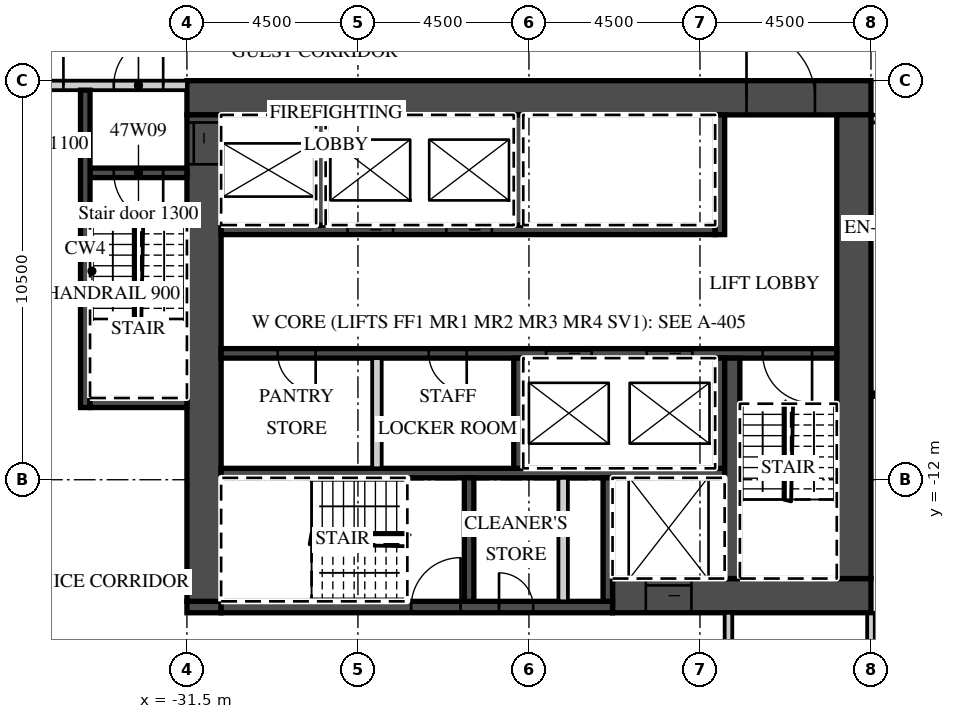
"""IFC4 building model, lengths in metres.
Left out: names, types, materials, properties, quantities, classifications, styles, units other than length and angle.
Written with IfcOpenShell. Run it as: python <this file> out.ifc"""

import sys

from ifc_helpers import new_model, si_unit, direction, frame, frame_2d, origin, place, context, subcontext, project, spatial, rectangle, extrude, element, fill, save


model = new_model("IFC4")
c1 = context("Model", 3, precision=1e-05, world=origin(), true_north=direction((0.0, 1.0)))
c2 = subcontext(c1, "Body", "Model", "MODEL_VIEW")
j1 = project(units=[si_unit("LENGTHUNIT", "METRE"), si_unit("PLANEANGLEUNIT", "RADIAN")], contexts=[c1])
p1 = place(None, origin())
s1 = spatial("IfcSite", under=j1, at=p1, CompositionType="ELEMENT")
p2 = place(p1, origin())
s2 = spatial("IfcBuilding", under=s1, at=p2, CompositionType="ELEMENT")
p3 = place(p2, frame((0.0, 0.0, 196.6)))
s3 = spatial("IfcBuildingStorey", under=s2, at=p3, CompositionType="ELEMENT", Elevation=196.6)
p4 = place(p3, frame((-13.5, -22.3, 0.0), z_axis=(0.0, 0.0, 1.0), x_axis=(0.0, 1.0, 0.0)))
e1 = element("IfcWall", 1, at=p4, inside=s3, PredefinedType="PARTITIONING", context=c2, shape_type="SweptSolid", body=[
    extrude(rectangle(XDim=6.8, YDim=0.2, at=frame_2d((3.4, 0.0))), origin(), (0.0, 0.0, 1.0), 3.02),
])
p5 = place(p3, frame((-13.5, -2.5, 0.0), z_axis=(0.0, 0.0, 1.0), x_axis=(1.0, 0.0, 0.0)))
e2 = element("IfcWall", 2, at=p5, inside=s3, PredefinedType="PARTITIONING", context=c2, shape_type="SweptSolid", body=[
    extrude(rectangle(XDim=27.0, YDim=0.2, at=frame_2d((13.5, 0.0))), origin(), (0.0, 0.0, 1.0), 3.02),
])
p6 = place(p5, frame((2.925, 0.0, 0.0)))
e3 = element("IfcOpeningElement", 3, at=p6, cuts=e2, PredefinedType="OPENING", context=c2, shape_type="SweptSolid", body=[
    extrude(rectangle(XDim=1.0, YDim=2.1, at=frame_2d((0.5, 1.05))), frame((0.0, 0.11, 0.0), z_axis=(0.0, -1.0, 0.0), x_axis=(1.0, 0.0, 0.0)), (0.0, 0.0, 1.0), 0.22),
])
p7 = place(p5, frame((5.075, 0.0, 0.0)))
e4 = element("IfcOpeningElement", 4, at=p7, cuts=e2, PredefinedType="OPENING", context=c2, shape_type="SweptSolid", body=[
    extrude(rectangle(XDim=1.0, YDim=2.1, at=frame_2d((0.5, 1.05))), frame((0.0, 0.11, 0.0), z_axis=(0.0, -1.0, 0.0), x_axis=(1.0, 0.0, 0.0)), (0.0, 0.0, 1.0), 0.22),
])
p8 = place(p5, frame((11.925, 0.0, 0.0)))
e5 = element("IfcOpeningElement", 5, at=p8, cuts=e2, PredefinedType="OPENING", context=c2, shape_type="SweptSolid", body=[
    extrude(rectangle(XDim=1.0, YDim=2.1, at=frame_2d((0.5, 1.05))), frame((0.0, 0.11, 0.0), z_axis=(0.0, -1.0, 0.0), x_axis=(1.0, 0.0, 0.0)), (0.0, 0.0, 1.0), 0.22),
])
p9 = place(p5, frame((15.938, 0.0, 0.0)))
e6 = element("IfcOpeningElement", 6, at=p9, cuts=e2, PredefinedType="OPENING", context=c2, shape_type="SweptSolid", body=[
    extrude(rectangle(XDim=1.2, YDim=2.1, at=frame_2d((0.6, 1.05))), frame((0.0, 0.11, 0.0), z_axis=(0.0, -1.0, 0.0), x_axis=(1.0, 0.0, 0.0)), (0.0, 0.0, 1.0), 0.22),
])
p10 = place(p5, frame((25.425, 0.0, 0.0)))
e7 = element("IfcOpeningElement", 7, at=p10, cuts=e2, PredefinedType="OPENING", context=c2, shape_type="SweptSolid", body=[
    extrude(rectangle(XDim=1.0, YDim=2.1, at=frame_2d((0.5, 1.05))), frame((0.0, 0.11, 0.0), z_axis=(0.0, -1.0, 0.0), x_axis=(1.0, 0.0, 0.0)), (0.0, 0.0, 1.0), 0.22),
])
p11 = place(p3, frame((-31.5, -1.95, 0.0), z_axis=(0.0, 0.0, 1.0), x_axis=(1.0, 0.0, 0.0)))
e8 = element("IfcWall", 8, at=p11, inside=s3, PredefinedType="SHEAR", context=c2, shape_type="SweptSolid", body=[
    extrude(rectangle(XDim=18.0, YDim=0.9, at=frame_2d((9.0, 0.0))), origin(), (0.0, 0.0, 1.0), 3.02),
])
p12 = place(p11, frame((14.725, 0.0, 0.0)))
e9 = element("IfcOpeningElement", 9, at=p12, cuts=e8, PredefinedType="OPENING", context=c2, shape_type="SweptSolid", body=[
    extrude(rectangle(XDim=1.8, YDim=2.1, at=frame_2d((0.9, 1.05))), frame((0.0, 0.46, 0.0), z_axis=(0.0, -1.0, 0.0), x_axis=(1.0, 0.0, 0.0)), (0.0, 0.0, 1.0), 0.92),
])
p13 = place(p3, frame((-20.3, -15.05, 0.0), z_axis=(0.0, 0.0, 1.0), x_axis=(1.0, 0.0, 0.0)))
e10 = element("IfcWall", 10, at=p13, inside=s3, PredefinedType="SHEAR", context=c2, shape_type="SweptSolid", body=[
    extrude(rectangle(XDim=6.8, YDim=0.9, at=frame_2d((3.4, 0.0))), origin(), (0.0, 0.0, 1.0), 3.02),
])
p14 = place(p13, frame((0.875, 0.0, 0.0)))
e11 = element("IfcOpeningElement", 11, at=p14, cuts=e10, PredefinedType="OPENING", context=c2, shape_type="SweptSolid", body=[
    extrude(rectangle(XDim=1.2, YDim=2.1, at=frame_2d((0.6, 1.05))), frame((0.0, 0.46, 0.0), z_axis=(0.0, -1.0, 0.0), x_axis=(1.0, 0.0, 0.0)), (0.0, 0.0, 1.0), 0.92),
])
p15 = place(p3, frame((-31.5, -15.35, 0.0), z_axis=(0.0, 0.0, 1.0), x_axis=(1.0, 0.0, 0.0)))
e12 = element("IfcWall", 12, at=p15, inside=s3, PredefinedType="SHEAR", context=c2, shape_type="SweptSolid", body=[
    extrude(rectangle(XDim=0.9, YDim=0.3, at=frame_2d((0.45, 0.0))), origin(), (0.0, 0.0, 1.0), 3.02),
])
p16 = place(p3, frame((-30.6, -15.35, 0.0), z_axis=(0.0, 0.0, 1.0), x_axis=(1.0, 0.0, 0.0)))
e13 = element("IfcWall", 13, at=p16, inside=s3, PredefinedType="SHEAR", context=c2, shape_type="SweptSolid", body=[
    extrude(rectangle(XDim=10.3, YDim=0.3, at=frame_2d((5.15, 0.0))), origin(), (0.0, 0.0, 1.0), 3.02),
])
p17 = place(p16, frame((5.0, 0.0, 0.0)))
e14 = element("IfcOpeningElement", 14, at=p17, cuts=e13, PredefinedType="OPENING", context=c2, shape_type="SweptSolid", body=[
    extrude(rectangle(XDim=1.3, YDim=2.1, at=frame_2d((0.65, 1.05))), frame((0.0, 0.16, 0.0), z_axis=(0.0, -1.0, 0.0), x_axis=(1.0, 0.0, 0.0)), (0.0, 0.0, 1.0), 0.32),
])
p18 = place(p16, frame((7.312, 0.0, 0.0)))
e15 = element("IfcOpeningElement", 15, at=p18, cuts=e13, PredefinedType="OPENING", context=c2, shape_type="SweptSolid", body=[
    extrude(rectangle(XDim=0.9, YDim=2.1, at=frame_2d((0.45, 1.05))), frame((0.0, 0.16, 0.0), z_axis=(0.0, -1.0, 0.0), x_axis=(1.0, 0.0, 0.0)), (0.0, 0.0, 1.0), 0.32),
])
p19 = place(p3, frame((-31.05, -15.2, 0.0), z_axis=(0.0, 0.0, 1.0), x_axis=(0.0, 1.0, 0.0)))
e16 = element("IfcWall", 16, at=p19, inside=s3, PredefinedType="SHEAR", context=c2, shape_type="SweptSolid", body=[
    extrude(rectangle(XDim=12.8, YDim=0.9, at=frame_2d((6.4, 0.0))), origin(), (0.0, 0.0, 1.0), 3.02),
])
p20 = place(p19, frame((11.5, 0.0, 0.0)))
e17 = element("IfcOpeningElement", 17, at=p20, cuts=e16, PredefinedType="OPENING", context=c2, shape_type="SweptSolid", body=[
    extrude(rectangle(XDim=1.1, YDim=2.1, at=frame_2d((0.55, 1.05))), frame((0.0, 0.46, 0.0), z_axis=(0.0, -1.0, 0.0), x_axis=(1.0, 0.0, 0.0)), (0.0, 0.0, 1.0), 0.92),
])
p21 = place(p3, frame((-13.95, -14.6, 0.0), z_axis=(0.0, 0.0, 1.0), x_axis=(0.0, 1.0, 0.0)))
e18 = element("IfcWall", 18, at=p21, inside=s3, PredefinedType="SHEAR", context=c2, shape_type="SweptSolid", body=[
    extrude(rectangle(XDim=12.2, YDim=0.9, at=frame_2d((6.1, 0.0))), origin(), (0.0, 0.0, 1.0), 3.02),
])
p22 = place(p3, frame((-30.6, -5.425, 0.0), z_axis=(0.0, 0.0, 1.0), x_axis=(1.0, 0.0, 0.0)))
e19 = element("IfcWall", 19, at=p22, inside=s3, PredefinedType="SHEAR", context=c2, shape_type="SweptSolid", body=[
    extrude(rectangle(XDim=13.0, YDim=0.25, at=frame_2d((6.5, 0.0))), origin(), (0.0, 0.0, 1.0), 3.02),
])
p23 = place(p22, frame((3.325, 0.0, 0.0)))
e20 = element("IfcOpeningElement", 20, at=p23, cuts=e19, PredefinedType="OPENING", context=c2, shape_type="SweptSolid", body=[
    extrude(rectangle(XDim=1.2, YDim=2.1, at=frame_2d((0.6, 1.05))), frame((0.0, 0.135, 0.0), z_axis=(0.0, -1.0, 0.0), x_axis=(1.0, 0.0, 0.0)), (0.0, 0.0, 1.0), 0.27),
])
p24 = place(p22, frame((5.925, 0.0, 0.0)))
e21 = element("IfcOpeningElement", 21, at=p24, cuts=e19, PredefinedType="OPENING", context=c2, shape_type="SweptSolid", body=[
    extrude(rectangle(XDim=1.2, YDim=2.1, at=frame_2d((0.6, 1.05))), frame((0.0, 0.135, 0.0), z_axis=(0.0, -1.0, 0.0), x_axis=(1.0, 0.0, 0.0)), (0.0, 0.0, 1.0), 0.27),
])
p25 = place(p3, frame((-17.475, -5.55, 0.0), z_axis=(0.0, 0.0, 1.0), x_axis=(0.0, 1.0, 0.0)))
e22 = element("IfcWall", 22, at=p25, inside=s3, PredefinedType="SHEAR", context=c2, shape_type="SweptSolid", body=[
    extrude(rectangle(XDim=3.15, YDim=0.25, at=frame_2d((1.575, 0.0))), origin(), (0.0, 0.0, 1.0), 3.02),
])
for number, where, z_axis, x_axis in (
    (23, (-27.975, -5.3, 0.0), (0.0, 0.0, 1.0), (0.0, 1.0, 0.0)),
    (24, (-22.775, -5.3, 0.0), (0.0, 0.0, 1.0), (0.0, 1.0, 0.0)),
):
    element("IfcWall", number, at=place(p3, frame(where, z_axis=z_axis, x_axis=x_axis)), inside=s3, PredefinedType="SHEAR", context=c2, shape_type="SweptSolid", body=[
        extrude(rectangle(XDim=2.9, YDim=0.25, at=frame_2d((1.45, 0.0))), origin(), (0.0, 0.0, 1.0), 3.02),
    ])
p26 = place(p3, frame((-30.6, -8.675, 0.0), z_axis=(0.0, 0.0, 1.0), x_axis=(1.0, 0.0, 0.0)))
e25 = element("IfcWall", 25, at=p26, inside=s3, PredefinedType="SHEAR", context=c2, shape_type="SweptSolid", body=[
    extrude(rectangle(XDim=16.2, YDim=0.25, at=frame_2d((8.1, 0.0))), origin(), (0.0, 0.0, 1.0), 3.02),
])
p27 = place(p26, frame((8.55, 0.0, 0.0)))
e26 = element("IfcOpeningElement", 26, at=p27, cuts=e25, PredefinedType="OPENING", context=c2, shape_type="SweptSolid", body=[
    extrude(rectangle(XDim=1.2, YDim=2.1, at=frame_2d((0.6, 1.05))), frame((0.0, 0.135, 0.0), z_axis=(0.0, -1.0, 0.0), x_axis=(1.0, 0.0, 0.0)), (0.0, 0.0, 1.0), 0.27),
])
p28 = place(p26, frame((11.2, 0.0, 0.0)))
e27 = element("IfcOpeningElement", 27, at=p28, cuts=e25, PredefinedType="OPENING", context=c2, shape_type="SweptSolid", body=[
    extrude(rectangle(XDim=1.2, YDim=2.1, at=frame_2d((0.6, 1.05))), frame((0.0, 0.135, 0.0), z_axis=(0.0, -1.0, 0.0), x_axis=(1.0, 0.0, 0.0)), (0.0, 0.0, 1.0), 0.27),
])
p29 = place(p26, frame((14.25, 0.0, 0.0)))
e28 = element("IfcOpeningElement", 28, at=p29, cuts=e25, PredefinedType="OPENING", context=c2, shape_type="SweptSolid", body=[
    extrude(rectangle(XDim=1.3, YDim=2.1, at=frame_2d((0.65, 1.05))), frame((0.0, 0.135, 0.0), z_axis=(0.0, -1.0, 0.0), x_axis=(1.0, 0.0, 0.0)), (0.0, 0.0, 1.0), 0.27),
])
p30 = place(p26, frame((1.488, 0.0, 0.0)))
e29 = element("IfcOpeningElement", 29, at=p30, cuts=e25, PredefinedType="OPENING", context=c2, shape_type="SweptSolid", body=[
    extrude(rectangle(XDim=1.0, YDim=2.1, at=frame_2d((0.5, 1.05))), frame((0.0, 0.135, 0.0), z_axis=(0.0, -1.0, 0.0), x_axis=(1.0, 0.0, 0.0)), (0.0, 0.0, 1.0), 0.27),
])
p31 = place(p26, frame((5.462, 0.0, 0.0)))
e30 = element("IfcOpeningElement", 30, at=p31, cuts=e25, PredefinedType="OPENING", context=c2, shape_type="SweptSolid", body=[
    extrude(rectangle(XDim=1.0, YDim=2.1, at=frame_2d((0.5, 1.05))), frame((0.0, 0.135, 0.0), z_axis=(0.0, -1.0, 0.0), x_axis=(1.0, 0.0, 0.0)), (0.0, 0.0, 1.0), 0.27),
])
p32 = place(p3, frame((-30.6, -11.825, 0.0), z_axis=(0.0, 0.0, 1.0), x_axis=(1.0, 0.0, 0.0)))
e31 = element("IfcWall", 31, at=p32, inside=s3, PredefinedType="SHEAR", context=c2, shape_type="SweptSolid", body=[
    extrude(rectangle(XDim=13.25, YDim=0.25, at=frame_2d((6.625, 0.0))), origin(), (0.0, 0.0, 1.0), 3.02),
])
for number, where, z_axis, x_axis in (
    (32, (-17.475, -11.7, 0.0), (0.0, 0.0, 1.0), (0.0, 1.0, 0.0)),
    (33, (-22.775, -11.7, 0.0), (0.0, 0.0, 1.0), (0.0, 1.0, 0.0)),
):
    element("IfcWall", number, at=place(p3, frame(where, z_axis=z_axis, x_axis=x_axis)), inside=s3, PredefinedType="SHEAR", context=c2, shape_type="SweptSolid", body=[
        extrude(rectangle(XDim=2.9, YDim=0.25, at=frame_2d((1.45, 0.0))), origin(), (0.0, 0.0, 1.0), 3.02),
    ])
p33 = place(p3, frame((-26.5, -11.7, 0.0), z_axis=(0.0, 0.0, 1.0), x_axis=(0.0, 1.0, 0.0)))
e34 = element("IfcWall", 34, at=p33, inside=s3, PredefinedType="PARTITIONING", context=c2, shape_type="SweptSolid", body=[
    extrude(rectangle(XDim=2.9, YDim=0.25, at=frame_2d((1.45, 0.0))), origin(), (0.0, 0.0, 1.0), 3.02),
])
p34 = place(p3, frame((-17.15, -14.6, 0.0), z_axis=(0.0, 0.0, 1.0), x_axis=(0.0, 1.0, 0.0)))
e35 = element("IfcWall", 35, at=p34, inside=s3, PredefinedType="SHEAR", context=c2, shape_type="SweptSolid", body=[
    extrude(rectangle(XDim=5.8, YDim=0.4, at=frame_2d((2.9, 0.0))), origin(), (0.0, 0.0, 1.0), 3.02),
])
for number, where, z_axis, x_axis in (
    (36, (-20.425, -15.2, 0.0), (0.0, 0.0, 1.0), (0.0, 1.0, 0.0)),
    (37, (-24.075, -15.2, 0.0), (0.0, 0.0, 1.0), (0.0, 1.0, 0.0)),
):
    element("IfcWall", number, at=place(p3, frame(where, z_axis=z_axis, x_axis=x_axis)), inside=s3, PredefinedType="SHEAR", context=c2, shape_type="SweptSolid", body=[
        extrude(rectangle(XDim=3.25, YDim=0.25, at=frame_2d((1.625, 0.0))), origin(), (0.0, 0.0, 1.0), 3.02),
    ])
p35 = place(p3, frame((-21.6, -15.2, 0.0), z_axis=(0.0, 0.0, 1.0), x_axis=(0.0, 1.0, 0.0)))
e38 = element("IfcWall", 38, at=p35, inside=s3, PredefinedType="PARTITIONING", context=c2, shape_type="SweptSolid", body=[
    extrude(rectangle(XDim=3.25, YDim=0.25, at=frame_2d((1.625, 0.0))), origin(), (0.0, 0.0, 1.0), 3.02),
])
p36 = place(p3, frame((-42.632, -1.625, 0.0), z_axis=(0.0, 0.0, 1.0), x_axis=(1.0, 0.0, 0.0)))
e39 = element("IfcWall", 39, at=p36, inside=s3, PredefinedType="PARTITIONING", context=c2, shape_type="SweptSolid", body=[
    extrude(rectangle(XDim=11.132, YDim=0.25, at=frame_2d((5.566, 0.0))), origin(), (0.0, 0.0, 1.0), 3.02),
])
p37 = place(p36, frame((9.207, 0.0, 0.0)))
e40 = element("IfcOpeningElement", 40, at=p37, cuts=e39, PredefinedType="OPENING", context=c2, shape_type="SweptSolid", body=[
    extrude(rectangle(XDim=1.3, YDim=2.1, at=frame_2d((0.65, 1.05))), frame((0.0, 0.135, 0.0), z_axis=(0.0, -1.0, 0.0), x_axis=(1.0, 0.0, 0.0)), (0.0, 0.0, 1.0), 0.27),
])
p38 = place(p36, frame((6.781, 0.0, 0.0)))
e41 = element("IfcOpeningElement", 41, at=p38, cuts=e39, PredefinedType="OPENING", context=c2, shape_type="SweptSolid", body=[
    extrude(rectangle(XDim=1.1, YDim=2.1, at=frame_2d((0.55, 1.05))), frame((0.0, 0.135, 0.0), z_axis=(0.0, -1.0, 0.0), x_axis=(1.0, 0.0, 0.0)), (0.0, 0.0, 1.0), 0.27),
])
p39 = place(p3, frame((-34.05, -3.925, 0.0), z_axis=(0.0, 0.0, 1.0), x_axis=(1.0, 0.0, 0.0)))
e42 = element("IfcWall", 42, at=p39, inside=s3, PredefinedType="SHEAR", context=c2, shape_type="SweptSolid", body=[
    extrude(rectangle(XDim=2.55, YDim=0.25, at=frame_2d((1.275, 0.0))), origin(), (0.0, 0.0, 1.0), 3.02),
])
p40 = place(p39, frame((0.625, 0.0, 0.0)))
e43 = element("IfcOpeningElement", 43, at=p40, cuts=e42, PredefinedType="OPENING", context=c2, shape_type="SweptSolid", body=[
    extrude(rectangle(XDim=1.3, YDim=2.1, at=frame_2d((0.65, 1.05))), frame((0.0, 0.135, 0.0), z_axis=(0.0, -1.0, 0.0), x_axis=(1.0, 0.0, 0.0)), (0.0, 0.0, 1.0), 0.27),
])
p41 = place(p3, frame((-34.175, -10.1, 0.0), z_axis=(0.0, 0.0, 1.0), x_axis=(0.0, 1.0, 0.0)))
e44 = element("IfcWall", 44, at=p41, inside=s3, PredefinedType="SHEAR", context=c2, shape_type="SweptSolid", body=[
    extrude(rectangle(XDim=8.35, YDim=0.25, at=frame_2d((4.175, 0.0))), origin(), (0.0, 0.0, 1.0), 3.02),
])
p42 = place(p3, frame((-34.05, -9.975, 0.0), z_axis=(0.0, 0.0, 1.0), x_axis=(1.0, 0.0, 0.0)))
e45 = element("IfcWall", 45, at=p42, inside=s3, PredefinedType="SHEAR", context=c2, shape_type="SweptSolid", body=[
    extrude(rectangle(XDim=2.55, YDim=0.25, at=frame_2d((1.275, 0.0))), origin(), (0.0, 0.0, 1.0), 3.02),
])
p43 = place(p3, frame((-17.25, -17.7, 0.0), z_axis=(0.0, 0.0, 1.0), x_axis=(0.0, 1.0, 0.0)))
e46 = element("IfcWall", 46, at=p43, inside=s3, PredefinedType="PARTITIONING", context=c2, shape_type="SweptSolid", body=[
    extrude(rectangle(XDim=2.2, YDim=0.2, at=frame_2d((1.1, 0.0))), origin(), (0.0, 0.0, 1.0), 3.02),
])
p44 = place(p27, origin())
e47 = element("IfcDoor", 47, at=p44, inside=s3, OperationType="SLIDING_TO_LEFT", PredefinedType="DOOR", context=c2, shape_type="SweptSolid", body=[
    extrude(rectangle(XDim=1.2, YDim=2.1, at=frame_2d((0.6, 1.05))), frame((0.0, 0.025, 0.0), z_axis=(0.0, -1.0, 0.0), x_axis=(1.0, 0.0, 0.0)), (0.0, 0.0, 1.0), 0.05),
])
fill(e26, e47)
p45 = place(p28, origin())
e48 = element("IfcDoor", 48, at=p45, inside=s3, OperationType="SLIDING_TO_RIGHT", PredefinedType="DOOR", context=c2, shape_type="SweptSolid", body=[
    extrude(rectangle(XDim=1.2, YDim=2.1, at=frame_2d((0.6, 1.05))), frame((0.0, 0.025, 0.0), z_axis=(0.0, -1.0, 0.0), x_axis=(1.0, 0.0, 0.0)), (0.0, 0.0, 1.0), 0.05),
])
fill(e27, e48)
p46 = place(p23, origin())
e49 = element("IfcDoor", 49, at=p46, inside=s3, OperationType="SLIDING_TO_RIGHT", PredefinedType="DOOR", context=c2, shape_type="SweptSolid", body=[
    extrude(rectangle(XDim=1.2, YDim=2.1, at=frame_2d((0.6, 1.05))), frame((0.0, 0.025, 0.0), z_axis=(0.0, -1.0, 0.0), x_axis=(1.0, 0.0, 0.0)), (0.0, 0.0, 1.0), 0.05),
])
fill(e20, e49)
p47 = place(p24, origin())
e50 = element("IfcDoor", 50, at=p47, inside=s3, OperationType="SLIDING_TO_RIGHT", PredefinedType="DOOR", context=c2, shape_type="SweptSolid", body=[
    extrude(rectangle(XDim=1.2, YDim=2.1, at=frame_2d((0.6, 1.05))), frame((0.0, 0.025, 0.0), z_axis=(0.0, -1.0, 0.0), x_axis=(1.0, 0.0, 0.0)), (0.0, 0.0, 1.0), 0.05),
])
fill(e21, e50)
p48 = place(p14, origin())
e51 = element("IfcDoor", 51, at=p48, inside=s3, OperationType="SLIDING_TO_LEFT", PredefinedType="DOOR", context=c2, shape_type="SweptSolid", body=[
    extrude(rectangle(XDim=1.2, YDim=2.1, at=frame_2d((0.6, 1.05))), frame((0.0, 0.025, 0.0), z_axis=(0.0, -1.0, 0.0), x_axis=(1.0, 0.0, 0.0)), (0.0, 0.0, 1.0), 0.05),
])
fill(e11, e51)
p49 = place(p20, origin())
e52 = element("IfcDoor", 52, at=p49, inside=s3, OperationType="SLIDING_TO_RIGHT", PredefinedType="DOOR", context=c2, shape_type="SweptSolid", body=[
    extrude(rectangle(XDim=1.1, YDim=2.1, at=frame_2d((0.55, 1.05))), frame((0.0, 0.025, 0.0), z_axis=(0.0, -1.0, 0.0), x_axis=(1.0, 0.0, 0.0)), (0.0, 0.0, 1.0), 0.05),
])
fill(e17, e52)
p50 = place(p12, origin())
e53 = element("IfcDoor", 53, at=p50, inside=s3, OperationType="DOUBLE_DOOR_DOUBLE_SWING", PredefinedType="DOOR", context=c2, shape_type="SweptSolid", body=[
    extrude(rectangle(XDim=1.8, YDim=2.1, at=frame_2d((0.9, 1.05))), frame((0.0, 0.025, 0.0), z_axis=(0.0, -1.0, 0.0), x_axis=(1.0, 0.0, 0.0)), (0.0, 0.0, 1.0), 0.05),
])
fill(e9, e53)
p51 = place(p37, origin())
e54 = element("IfcDoor", 54, at=p51, inside=s3, OperationType="SINGLE_SWING_RIGHT", PredefinedType="DOOR", context=c2, shape_type="SweptSolid", body=[
    extrude(rectangle(XDim=1.3, YDim=2.1, at=frame_2d((0.65, 1.05))), frame((0.0, 0.025, 0.0), z_axis=(0.0, -1.0, 0.0), x_axis=(1.0, 0.0, 0.0)), (0.0, 0.0, 1.0), 0.05),
])
fill(e40, e54)
p52 = place(p40, origin())
e55 = element("IfcDoor", 55, at=p52, inside=s3, OperationType="SINGLE_SWING_RIGHT", PredefinedType="DOOR", context=c2, shape_type="SweptSolid", body=[
    extrude(rectangle(XDim=1.3, YDim=2.1, at=frame_2d((0.65, 1.05))), frame((0.0, 0.025, 0.0), z_axis=(0.0, -1.0, 0.0), x_axis=(1.0, 0.0, 0.0)), (0.0, 0.0, 1.0), 0.05),
])
fill(e43, e55)
p53 = place(p38, origin())
e56 = element("IfcDoor", 56, at=p53, inside=s3, OperationType="SINGLE_SWING_RIGHT", PredefinedType="DOOR", context=c2, shape_type="SweptSolid", body=[
    extrude(rectangle(XDim=1.1, YDim=2.1, at=frame_2d((0.55, 1.05))), frame((0.0, 0.025, 0.0), z_axis=(0.0, -1.0, 0.0), x_axis=(1.0, 0.0, 0.0)), (0.0, 0.0, 1.0), 0.05),
])
fill(e41, e56)
p54 = place(p29, origin())
e57 = element("IfcDoor", 57, at=p54, inside=s3, OperationType="SINGLE_SWING_RIGHT", PredefinedType="DOOR", context=c2, shape_type="SweptSolid", body=[
    extrude(rectangle(XDim=1.3, YDim=2.1, at=frame_2d((0.65, 1.05))), frame((0.0, 0.025, 0.0), z_axis=(0.0, -1.0, 0.0), x_axis=(1.0, 0.0, 0.0)), (0.0, 0.0, 1.0), 0.05),
])
fill(e28, e57)
p55 = place(p17, origin())
e58 = element("IfcDoor", 58, at=p55, inside=s3, OperationType="SINGLE_SWING_RIGHT", PredefinedType="DOOR", context=c2, shape_type="SweptSolid", body=[
    extrude(rectangle(XDim=1.3, YDim=2.1, at=frame_2d((0.65, 1.05))), frame((0.0, 0.025, 0.0), z_axis=(0.0, -1.0, 0.0), x_axis=(1.0, 0.0, 0.0)), (0.0, 0.0, 1.0), 0.05),
])
fill(e14, e58)
p56 = place(p18, origin())
e59 = element("IfcDoor", 59, at=p56, inside=s3, OperationType="SINGLE_SWING_LEFT", PredefinedType="DOOR", context=c2, shape_type="SweptSolid", body=[
    extrude(rectangle(XDim=0.9, YDim=2.1, at=frame_2d((0.45, 1.05))), frame((0.0, 0.025, 0.0), z_axis=(0.0, -1.0, 0.0), x_axis=(1.0, 0.0, 0.0)), (0.0, 0.0, 1.0), 0.05),
])
fill(e15, e59)
p57 = place(p30, origin())
e60 = element("IfcDoor", 60, at=p57, inside=s3, OperationType="SINGLE_SWING_RIGHT", PredefinedType="DOOR", context=c2, shape_type="SweptSolid", body=[
    extrude(rectangle(XDim=1.0, YDim=2.1, at=frame_2d((0.5, 1.05))), frame((0.0, 0.025, 0.0), z_axis=(0.0, -1.0, 0.0), x_axis=(1.0, 0.0, 0.0)), (0.0, 0.0, 1.0), 0.05),
])
fill(e29, e60)
p58 = place(p31, origin())
e61 = element("IfcDoor", 61, at=p58, inside=s3, OperationType="SINGLE_SWING_RIGHT", PredefinedType="DOOR", context=c2, shape_type="SweptSolid", body=[
    extrude(rectangle(XDim=1.0, YDim=2.1, at=frame_2d((0.5, 1.05))), frame((0.0, 0.025, 0.0), z_axis=(0.0, -1.0, 0.0), x_axis=(1.0, 0.0, 0.0)), (0.0, 0.0, 1.0), 0.05),
])
fill(e30, e61)
save(model, sys.argv[1])
